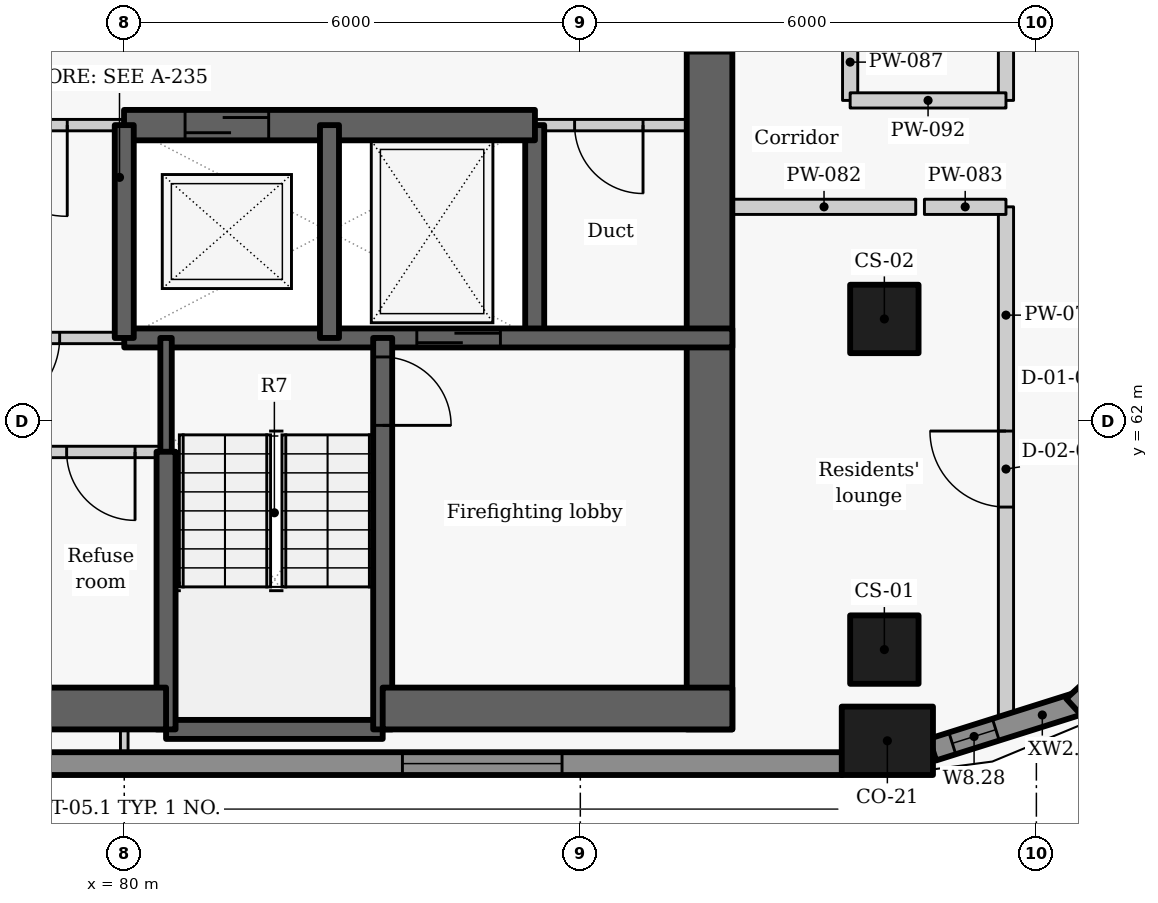
"""IFC4 building model, lengths in metres.
Left out: names, types, materials, properties, quantities, classifications, styles, units other than length and angle.
Written with IfcOpenShell. Run it as: python <this file> out.ifc"""

import sys

from ifc_helpers import new_model, si_unit, direction, frame, frame_2d, origin, origin_2d, place, context, subcontext, project, spatial, rectangle, extrude, element, fill, save


model = new_model("IFC4")
c1 = context("Model", 3, precision=1e-05, world=origin(), true_north=direction((0.0, 1.0)))
c2 = subcontext(c1, "Body", "Model", "MODEL_VIEW")
j1 = project(units=[si_unit("LENGTHUNIT", "METRE"), si_unit("PLANEANGLEUNIT", "RADIAN")], contexts=[c1])
p1 = place(None, origin())
s1 = spatial("IfcSite", under=j1, at=p1, CompositionType="ELEMENT")
p2 = place(p1, origin())
s2 = spatial("IfcBuilding", under=s1, at=p2, CompositionType="ELEMENT")
p3 = place(p2, frame((0.0, 0.0, 203.1)))
s3 = spatial("IfcBuildingStorey", under=s2, at=p3, CompositionType="ELEMENT", Elevation=203.1)
p4 = place(p3, frame((90.04, 57.8, 0.0), z_axis=(0.0, 0.0, 1.0), x_axis=(1.0, 0.0, 0.0)))
e1 = element("IfcColumn", 1, at=p4, inside=s3, PredefinedType="COLUMN", context=c2, shape_type="SweptSolid", body=[
    extrude(rectangle(XDim=1.2, YDim=0.9, at=origin_2d()), origin(), (0.0, 0.0, 1.0), 3.3),
])
for number, where, z_axis, x_axis in (
    (2, (90.0, 59.0, 0.0), (0.0, 0.0, 1.0), (0.0, 1.0, 0.0)),
    (3, (90.0, 63.35, 0.0), (0.0, 0.0, 1.0), (0.0, 1.0, 0.0)),
):
    element("IfcColumn", number, at=place(p3, frame(where, z_axis=z_axis, x_axis=x_axis)), inside=s3, PredefinedType="COLUMN", context=c2, shape_type="SweptSolid", body=[
        extrude(rectangle(XDim=0.9, YDim=0.9, at=origin_2d()), origin(), (0.0, 0.0, 1.0), 3.3),
    ])
p5 = place(p3, frame((70.551, 57.5, 0.0), z_axis=(0.0, 0.0, 1.0), x_axis=(1.0, 0.0, 0.0)))
e4 = element("IfcWall", 4, at=p5, inside=s3, PredefinedType="SOLIDWALL", context=c2, shape_type="SweptSolid", body=[
    extrude(rectangle(XDim=18.893, YDim=0.3, at=frame_2d((9.446, 0.0))), origin(), (0.0, 0.0, 1.0), 2.425),
])
p6 = place(p5, frame((3.687, 0.0, 0.9)))
e5 = element("IfcOpeningElement", 5, at=p6, cuts=e4, PredefinedType="OPENING", context=c2, shape_type="SweptSolid", body=[
    extrude(rectangle(XDim=2.1, YDim=1.1, at=frame_2d((1.05, 0.55))), frame((0.0, 0.16, 0.0), z_axis=(0.0, -1.0, 0.0), x_axis=(1.0, 0.0, 0.0)), (0.0, 0.0, 1.0), 0.32),
])
p7 = place(p5, frame((13.109, 0.0, 0.9)))
e6 = element("IfcOpeningElement", 6, at=p7, cuts=e4, PredefinedType="OPENING", context=c2, shape_type="SweptSolid", body=[
    extrude(rectangle(XDim=2.1, YDim=1.1, at=frame_2d((1.05, 0.55))), frame((0.0, 0.16, 0.0), z_axis=(0.0, -1.0, 0.0), x_axis=(1.0, 0.0, 0.0)), (0.0, 0.0, 1.0), 0.32),
])
p8 = place(p3, frame((90.636, 57.685, 0.0), z_axis=(0.0, 0.0, 1.0), x_axis=(0.95368324118, 0.300812691707, 0.0)))
e7 = element("IfcWall", 7, at=p8, inside=s3, PredefinedType="SOLIDWALL", context=c2, shape_type="SweptSolid", body=[
    extrude(rectangle(XDim=2.053, YDim=0.3, at=frame_2d((1.027, 0.0))), origin(), (0.0, 0.0, 1.0), 2.425),
])
p9 = place(p8, frame((0.271, 0.0, 0.9)))
e8 = element("IfcOpeningElement", 8, at=p9, cuts=e7, PredefinedType="OPENING", context=c2, shape_type="SweptSolid", body=[
    extrude(rectangle(XDim=0.6, YDim=1.1, at=frame_2d((0.3, 0.55))), frame((0.0, 0.16, 0.0), z_axis=(0.0, -1.0, 0.0), x_axis=(1.0, 0.0, 0.0)), (0.0, 0.0, 1.0), 0.32),
])
p10 = place(p3, frame((92.494, 58.244, 0.0), z_axis=(0.0, 0.0, 1.0), x_axis=(0.73764876128, 0.675184645102, 0.0)))
e9 = element("IfcWall", 9, at=p10, inside=s3, PredefinedType="SOLIDWALL", context=c2, shape_type="SweptSolid", body=[
    extrude(rectangle(XDim=2.048, YDim=0.3, at=frame_2d((1.024, 0.0))), origin(), (0.0, 0.0, 1.0), 2.425),
])
p11 = place(p3, frame((85.4, 63.1, -0.275), z_axis=(0.0, 0.0, 1.0), x_axis=(0.0, 1.0, 0.0)))
e10 = element("IfcWall", 10, at=p11, inside=s3, PredefinedType="SHEAR", context=c2, shape_type="SweptSolid", body=[
    extrude(rectangle(XDim=2.8, YDim=0.25, at=frame_2d((1.4, 0.0))), origin(), (0.0, 0.0, 1.0), 3.3),
])
p12 = place(p3, frame((87.7, 72.2, -0.275), z_axis=(0.0, 0.0, 1.0), x_axis=(0.0, -1.0, 0.0)))
e11 = element("IfcWall", 11, at=p12, inside=s3, PredefinedType="SHEAR", context=c2, shape_type="SweptSolid", body=[
    extrude(rectangle(XDim=14.25, YDim=0.6, at=frame_2d((7.125, 0.0))), origin(), (0.0, 0.0, 1.0), 3.3),
])
p13 = place(p12, frame((3.852, 0.0, 0.275)))
e12 = element("IfcOpeningElement", 12, at=p13, cuts=e11, PredefinedType="OPENING", context=c2, shape_type="SweptSolid", body=[
    extrude(rectangle(XDim=1.5, YDim=2.1, at=frame_2d((0.75, 1.05))), frame((0.0, 0.31, 0.0), z_axis=(0.0, -1.0, 0.0), x_axis=(1.0, 0.0, 0.0)), (0.0, 0.0, 1.0), 0.62),
])
p14 = place(p3, frame((80.003, 65.9, 0.0), z_axis=(0.0, 0.0, 1.0), x_axis=(-1.0, 0.0, 0.0)))
e13 = element("IfcWall", 13, at=p14, inside=s3, PredefinedType="PARTITIONING", context=c2, shape_type="SweptSolid", body=[
    extrude(rectangle(XDim=2.706, YDim=0.15, at=frame_2d((1.353, 0.0))), origin(), (0.0, 0.0, 1.0), 3.025),
])
p15 = place(p14, frame((0.753, 0.0, 0.0)))
e14 = element("IfcOpeningElement", 14, at=p15, cuts=e13, PredefinedType="OPENING", context=c2, shape_type="SweptSolid", body=[
    extrude(rectangle(XDim=1.2, YDim=2.1, at=frame_2d((0.6, 1.05))), frame((0.0, 0.085, 0.0), z_axis=(0.0, -1.0, 0.0), x_axis=(1.0, 0.0, 0.0)), (0.0, 0.0, 1.0), 0.17),
])
p16 = place(p3, frame((88.0, 65.9, 0.0), z_axis=(0.0, 0.0, 1.0), x_axis=(-1.0, 0.0, 0.0)))
e15 = element("IfcWall", 15, at=p16, inside=s3, PredefinedType="PARTITIONING", context=c2, shape_type="SweptSolid", body=[
    extrude(rectangle(XDim=2.603, YDim=0.15, at=frame_2d((1.302, 0.0))), origin(), (0.0, 0.0, 1.0), 3.025),
])
p17 = place(p16, frame((1.175, 0.0, 0.0)))
e16 = element("IfcOpeningElement", 16, at=p17, cuts=e15, PredefinedType="OPENING", context=c2, shape_type="SweptSolid", body=[
    extrude(rectangle(XDim=0.9, YDim=2.1, at=frame_2d((0.45, 1.05))), frame((0.0, 0.085, 0.0), z_axis=(0.0, -1.0, 0.0), x_axis=(1.0, 0.0, 0.0)), (0.0, 0.0, 1.0), 0.17),
])
p18 = place(p3, frame((79.997, 65.9, -0.275), z_axis=(0.0, 0.0, 1.0), x_axis=(1.0, 0.0, 0.0)))
e17 = element("IfcWall", 17, at=p18, inside=s3, PredefinedType="SHEAR", context=c2, shape_type="SweptSolid", body=[
    extrude(rectangle(XDim=5.406, YDim=0.4, at=frame_2d((2.703, 0.0))), origin(), (0.0, 0.0, 1.0), 3.3),
])
p19 = place(p18, frame((0.803, 0.0, 0.275)))
e18 = element("IfcOpeningElement", 18, at=p19, cuts=e17, PredefinedType="OPENING", context=c2, shape_type="SweptSolid", body=[
    extrude(rectangle(XDim=1.1, YDim=2.1, at=frame_2d((0.55, 1.05))), frame((0.0, 0.21, 0.0), z_axis=(0.0, -1.0, 0.0), x_axis=(1.0, 0.0, 0.0)), (0.0, 0.0, 1.0), 0.42),
])
p20 = place(p3, frame((80.0, 63.1, -0.275), z_axis=(0.0, 0.0, 1.0), x_axis=(1.0, 0.0, 0.0)))
e19 = element("IfcWall", 19, at=p20, inside=s3, PredefinedType="SHEAR", context=c2, shape_type="SweptSolid", body=[
    extrude(rectangle(XDim=8.0, YDim=0.25, at=frame_2d((4.0, 0.0))), origin(), (0.0, 0.0, 1.0), 3.3),
])
p21 = place(p20, frame((3.849, 0.0, 0.275)))
e20 = element("IfcOpeningElement", 20, at=p21, cuts=e19, PredefinedType="OPENING", context=c2, shape_type="SweptSolid", body=[
    extrude(rectangle(XDim=1.1, YDim=2.1, at=frame_2d((0.55, 1.05))), frame((0.0, 0.135, 0.0), z_axis=(0.0, -1.0, 0.0), x_axis=(1.0, 0.0, 0.0)), (0.0, 0.0, 1.0), 0.27),
])
p22 = place(p3, frame((80.0, 63.1, -0.275), z_axis=(0.0, 0.0, 1.0), x_axis=(0.0, 1.0, 0.0)))
e21 = element("IfcWall", 21, at=p22, inside=s3, PredefinedType="SHEAR", context=c2, shape_type="SweptSolid", body=[
    extrude(rectangle(XDim=2.8, YDim=0.25, at=frame_2d((1.4, 0.0))), origin(), (0.0, 0.0, 1.0), 3.3),
])
p23 = place(p3, frame((80.0, 63.1, 0.0), z_axis=(0.0, 0.0, 1.0), x_axis=(-1.0, 0.0, 0.0)))
e22 = element("IfcWall", 22, at=p23, inside=s3, PredefinedType="PARTITIONING", context=c2, shape_type="SweptSolid", body=[
    extrude(rectangle(XDim=2.7, YDim=0.15, at=frame_2d((1.35, 0.0))), origin(), (0.0, 0.0, 1.0), 3.025),
])
p24 = place(p23, frame((0.85, 0.0, 0.0)))
e23 = element("IfcOpeningElement", 23, at=p24, cuts=e22, PredefinedType="OPENING", context=c2, shape_type="SweptSolid", body=[
    extrude(rectangle(XDim=1.0, YDim=2.1, at=frame_2d((0.5, 1.05))), frame((0.0, 0.085, 0.0), z_axis=(0.0, -1.0, 0.0), x_axis=(1.0, 0.0, 0.0)), (0.0, 0.0, 1.0), 0.17),
])
p25 = place(p3, frame((82.7, 63.1, -0.275), z_axis=(0.0, 0.0, 1.0), x_axis=(0.0, 1.0, 0.0)))
e24 = element("IfcWall", 24, at=p25, inside=s3, PredefinedType="SHEAR", context=c2, shape_type="SweptSolid", body=[
    extrude(rectangle(XDim=2.8, YDim=0.25, at=frame_2d((1.4, 0.0))), origin(), (0.0, 0.0, 1.0), 3.3),
])
p26 = place(p3, frame((80.55, 57.95, -0.275), z_axis=(0.0, 0.0, 1.0), x_axis=(1.0, 0.0, 0.0)))
e25 = element("IfcWall", 25, at=p26, inside=s3, PredefinedType="SHEAR", context=c2, shape_type="SweptSolid", body=[
    extrude(rectangle(XDim=2.85, YDim=0.25, at=frame_2d((1.425, 0.0))), origin(), (0.0, 0.0, 1.0), 3.3),
])
p27 = place(p3, frame((83.4, 63.1, -0.275), z_axis=(0.0, 0.0, 1.0), x_axis=(0.0, -1.0, 0.0)))
e26 = element("IfcWall", 26, at=p27, inside=s3, PredefinedType="SHEAR", context=c2, shape_type="SweptSolid", body=[
    extrude(rectangle(XDim=5.15, YDim=0.25, at=frame_2d((2.575, 0.0))), origin(), (0.0, 0.0, 1.0), 3.3),
])
p28 = place(p27, frame((0.25, 0.0, 0.275)))
e27 = element("IfcOpeningElement", 27, at=p28, cuts=e26, PredefinedType="OPENING", context=c2, shape_type="SweptSolid", body=[
    extrude(rectangle(XDim=0.9, YDim=2.1, at=frame_2d((0.45, 1.05))), frame((0.0, 0.135, 0.0), z_axis=(0.0, -1.0, 0.0), x_axis=(1.0, 0.0, 0.0)), (0.0, 0.0, 1.0), 0.27),
])
p29 = place(p3, frame((80.55, 61.597, -0.275), z_axis=(0.0, 0.0, 1.0), x_axis=(0.0, 1.0, 0.0)))
e28 = element("IfcWall", 28, at=p29, inside=s3, PredefinedType="SHEAR", context=c2, shape_type="SweptSolid", body=[
    extrude(rectangle(XDim=1.503, YDim=0.15, at=frame_2d((0.751, 0.0))), origin(), (0.0, 0.0, 1.0), 3.3),
])
p30 = place(p3, frame((80.55, 57.95, -0.275), z_axis=(0.0, 0.0, 1.0), x_axis=(0.0, 1.0, 0.0)))
e29 = element("IfcWall", 29, at=p30, inside=s3, PredefinedType="SHEAR", context=c2, shape_type="SweptSolid", body=[
    extrude(rectangle(XDim=3.653, YDim=0.25, at=frame_2d((1.827, 0.0))), origin(), (0.0, 0.0, 1.0), 3.3),
])
p31 = place(p3, frame((75.35, 58.225, -0.275), z_axis=(0.0, 0.0, 1.0), x_axis=(1.0, 0.0, 0.0)))
e30 = element("IfcWall", 30, at=p31, inside=s3, PredefinedType="SHEAR", context=c2, shape_type="SweptSolid", body=[
    extrude(rectangle(XDim=5.2, YDim=0.55, at=frame_2d((2.6, 0.0))), origin(), (0.0, 0.0, 1.0), 3.3),
])
p32 = place(p3, frame((83.4, 58.225, -0.275), z_axis=(0.0, 0.0, 1.0), x_axis=(1.0, 0.0, 0.0)))
e31 = element("IfcWall", 31, at=p32, inside=s3, PredefinedType="SHEAR", context=c2, shape_type="SweptSolid", body=[
    extrude(rectangle(XDim=4.6, YDim=0.55, at=frame_2d((2.3, 0.0))), origin(), (0.0, 0.0, 1.0), 3.3),
])
p33 = place(p3, frame((80.55, 61.6, 0.0), z_axis=(0.0, 0.0, 1.0), x_axis=(-1.0, 0.0, 0.0)))
e32 = element("IfcWall", 32, at=p33, inside=s3, PredefinedType="PARTITIONING", context=c2, shape_type="SweptSolid", body=[
    extrude(rectangle(XDim=5.2, YDim=0.15, at=frame_2d((2.6, 0.0))), origin(), (0.0, 0.0, 1.0), 3.025),
])
p34 = place(p33, frame((3.866, 0.0, 0.0)))
e33 = element("IfcOpeningElement", 33, at=p34, cuts=e32, PredefinedType="OPENING", context=c2, shape_type="SweptSolid", body=[
    extrude(rectangle(XDim=0.9, YDim=2.1, at=frame_2d((0.45, 1.05))), frame((0.0, 0.085, 0.0), z_axis=(0.0, -1.0, 0.0), x_axis=(1.0, 0.0, 0.0)), (0.0, 0.0, 1.0), 0.17),
])
p35 = place(p33, frame((2.124, 0.0, 0.0)))
e34 = element("IfcOpeningElement", 34, at=p35, cuts=e32, PredefinedType="OPENING", context=c2, shape_type="SweptSolid", body=[
    extrude(rectangle(XDim=0.9, YDim=2.1, at=frame_2d((0.45, 1.05))), frame((0.0, 0.085, 0.0), z_axis=(0.0, -1.0, 0.0), x_axis=(1.0, 0.0, 0.0)), (0.0, 0.0, 1.0), 0.17),
])
p36 = place(p33, frame((0.408, 0.0, 0.0)))
e35 = element("IfcOpeningElement", 35, at=p36, cuts=e32, PredefinedType="OPENING", context=c2, shape_type="SweptSolid", body=[
    extrude(rectangle(XDim=0.9, YDim=2.1, at=frame_2d((0.45, 1.05))), frame((0.0, 0.085, 0.0), z_axis=(0.0, -1.0, 0.0), x_axis=(1.0, 0.0, 0.0)), (0.0, 0.0, 1.0), 0.17),
])
p37 = place(p3, frame((91.6, 57.926, 0.0), z_axis=(0.0, 0.0, 1.0), x_axis=(0.0, 1.0, 0.0)))
e36 = element("IfcWall", 36, at=p37, inside=s3, PredefinedType="PARTITIONING", context=c2, shape_type="SweptSolid", body=[
    extrude(rectangle(XDim=6.899, YDim=0.2, at=frame_2d((3.449, 0.0))), origin(), (0.0, 0.0, 1.0), 2.405),
])
p38 = place(p37, frame((2.949, 0.0, 0.0)))
e37 = element("IfcOpeningElement", 37, at=p38, cuts=e36, PredefinedType="OPENING", context=c2, shape_type="SweptSolid", body=[
    extrude(rectangle(XDim=1.0, YDim=2.1, at=frame_2d((0.5, 1.05))), frame((0.0, 0.11, 0.0), z_axis=(0.0, -1.0, 0.0), x_axis=(1.0, 0.0, 0.0)), (0.0, 0.0, 1.0), 0.22),
])
p39 = place(p3, frame((91.6, 66.225, 0.0), z_axis=(0.0, 0.0, 1.0), x_axis=(0.0, 1.0, 0.0)))
e38 = element("IfcWall", 38, at=p39, inside=s3, PredefinedType="PARTITIONING", context=c2, shape_type="SweptSolid", body=[
    extrude(rectangle(XDim=5.298, YDim=0.2, at=frame_2d((2.649, 0.0))), origin(), (0.0, 0.0, 1.0), 3.025),
])
p40 = place(p39, frame((2.148, 0.0, 0.0)))
e39 = element("IfcOpeningElement", 39, at=p40, cuts=e38, PredefinedType="OPENING", context=c2, shape_type="SweptSolid", body=[
    extrude(rectangle(XDim=1.0, YDim=2.1, at=frame_2d((0.5, 1.05))), frame((0.0, 0.11, 0.0), z_axis=(0.0, -1.0, 0.0), x_axis=(1.0, 0.0, 0.0)), (0.0, 0.0, 1.0), 0.22),
])
p41 = place(p3, frame((88.0, 64.825, 0.0), z_axis=(0.0, 0.0, 1.0), x_axis=(1.0, 0.0, 0.0)))
e40 = element("IfcWall", 40, at=p41, inside=s3, PredefinedType="PARTITIONING", context=c2, shape_type="SweptSolid", body=[
    extrude(rectangle(XDim=2.413, YDim=0.2, at=frame_2d((1.207, 0.0))), origin(), (0.0, 0.0, 1.0), 2.505),
])
p42 = place(p3, frame((90.527, 64.825, 0.0), z_axis=(0.0, 0.0, 1.0), x_axis=(1.0, 0.0, 0.0)))
e41 = element("IfcWall", 41, at=p42, inside=s3, PredefinedType="PARTITIONING", context=c2, shape_type="SweptSolid", body=[
    extrude(rectangle(XDim=1.073, YDim=0.2, at=frame_2d((0.537, 0.0))), origin(), (0.0, 0.0, 1.0), 3.025),
])
p43 = place(p3, frame((89.55, 66.225, 0.0), z_axis=(0.0, 0.0, 1.0), x_axis=(0.0, 1.0, 0.0)))
e42 = element("IfcWall", 42, at=p43, inside=s3, PredefinedType="PARTITIONING", context=c2, shape_type="SweptSolid", body=[
    extrude(rectangle(XDim=1.008, YDim=0.2, at=frame_2d((0.504, 0.0))), origin(), (0.0, 0.0, 1.0), 3.025),
])
p44 = place(p3, frame((89.55, 66.225, 0.0), z_axis=(0.0, 0.0, 1.0), x_axis=(1.0, 0.0, 0.0)))
e43 = element("IfcWall", 43, at=p44, inside=s3, PredefinedType="PARTITIONING", context=c2, shape_type="SweptSolid", body=[
    extrude(rectangle(XDim=2.05, YDim=0.2, at=frame_2d((1.025, 0.0))), origin(), (0.0, 0.0, 1.0), 2.505),
])
p45 = place(p3, frame((80.0, 57.65, 0.0), z_axis=(0.0, 0.0, 1.0), x_axis=(0.0, 1.0, 0.0)))
e44 = element("IfcWall", 44, at=p45, inside=s3, PredefinedType="PARTITIONING", context=c2, shape_type="SweptSolid", body=[
    extrude(rectangle(XDim=0.3, YDim=0.1, at=frame_2d((0.15, 0.0))), origin(), (0.0, 0.0, 1.0), 3.025),
])
p46 = place(p7, origin())
e45 = element("IfcWindow", 45, at=p46, inside=s3, PartitioningType="SINGLE_PANEL", PredefinedType="WINDOW", context=c2, shape_type="SweptSolid", body=[
    extrude(rectangle(XDim=2.1, YDim=1.1, at=frame_2d((1.05, 0.55))), frame((0.0, 0.03, 0.0), z_axis=(0.0, -1.0, 0.0), x_axis=(1.0, 0.0, 0.0)), (0.0, 0.0, 1.0), 0.06),
])
fill(e6, e45)
p47 = place(p9, origin())
e46 = element("IfcWindow", 46, at=p47, inside=s3, PartitioningType="SINGLE_PANEL", PredefinedType="WINDOW", context=c2, shape_type="SweptSolid", body=[
    extrude(rectangle(XDim=0.6, YDim=1.1, at=frame_2d((0.3, 0.55))), frame((0.0, 0.03, 0.0), z_axis=(0.0, -1.0, 0.0), x_axis=(1.0, 0.0, 0.0)), (0.0, 0.0, 1.0), 0.06),
])
fill(e8, e46)
p48 = place(p15, origin())
e47 = element("IfcDoor", 47, at=p48, inside=s3, OperationType="DOUBLE_DOOR_SINGLE_SWING", PredefinedType="DOOR", context=c2, shape_type="SweptSolid", body=[
    extrude(rectangle(XDim=1.2, YDim=2.1, at=frame_2d((0.6, 1.05))), frame((0.0, 0.025, 0.0), z_axis=(0.0, -1.0, 0.0), x_axis=(1.0, 0.0, 0.0)), (0.0, 0.0, 1.0), 0.05),
])
fill(e14, e47)
p49 = place(p19, origin())
e48 = element("IfcDoor", 48, at=p49, inside=s3, OperationType="SLIDING_TO_LEFT", PredefinedType="DOOR", context=c2, shape_type="SweptSolid", body=[
    extrude(rectangle(XDim=1.1, YDim=2.1, at=frame_2d((0.55, 1.05))), frame((0.0, 0.025, 0.0), z_axis=(0.0, -1.0, 0.0), x_axis=(1.0, 0.0, 0.0)), (0.0, 0.0, 1.0), 0.05),
])
fill(e18, e48)
p50 = place(p21, origin())
e49 = element("IfcDoor", 49, at=p50, inside=s3, OperationType="SLIDING_TO_LEFT", PredefinedType="DOOR", context=c2, shape_type="SweptSolid", body=[
    extrude(rectangle(XDim=1.1, YDim=2.1, at=frame_2d((0.55, 1.05))), frame((0.0, 0.025, 0.0), z_axis=(0.0, -1.0, 0.0), x_axis=(1.0, 0.0, 0.0)), (0.0, 0.0, 1.0), 0.05),
])
fill(e20, e49)
p51 = place(p17, origin())
e50 = element("IfcDoor", 50, at=p51, inside=s3, OperationType="SINGLE_SWING_LEFT", PredefinedType="DOOR", context=c2, shape_type="SweptSolid", body=[
    extrude(rectangle(XDim=0.9, YDim=2.1, at=frame_2d((0.45, 1.05))), frame((0.0, 0.025, 0.0), z_axis=(0.0, -1.0, 0.0), x_axis=(1.0, 0.0, 0.0)), (0.0, 0.0, 1.0), 0.05),
])
fill(e16, e50)
p52 = place(p24, origin())
e51 = element("IfcDoor", 51, at=p52, inside=s3, OperationType="SINGLE_SWING_RIGHT", PredefinedType="DOOR", context=c2, shape_type="SweptSolid", body=[
    extrude(rectangle(XDim=1.0, YDim=2.1, at=frame_2d((0.5, 1.05))), frame((0.0, 0.025, 0.0), z_axis=(0.0, -1.0, 0.0), x_axis=(1.0, 0.0, 0.0)), (0.0, 0.0, 1.0), 0.05),
])
fill(e23, e51)
p53 = place(p36, origin())
e52 = element("IfcDoor", 52, at=p53, inside=s3, OperationType="SINGLE_SWING_LEFT", PredefinedType="DOOR", context=c2, shape_type="SweptSolid", body=[
    extrude(rectangle(XDim=0.9, YDim=2.1, at=frame_2d((0.45, 1.05))), frame((0.0, 0.025, 0.0), z_axis=(0.0, -1.0, 0.0), x_axis=(1.0, 0.0, 0.0)), (0.0, 0.0, 1.0), 0.05),
])
fill(e35, e52)
p54 = place(p28, origin())
e53 = element("IfcDoor", 53, at=p54, inside=s3, OperationType="SINGLE_SWING_RIGHT", PredefinedType="DOOR", context=c2, shape_type="SweptSolid", body=[
    extrude(rectangle(XDim=0.9, YDim=2.1, at=frame_2d((0.45, 1.05))), frame((0.0, 0.025, 0.0), z_axis=(0.0, -1.0, 0.0), x_axis=(1.0, 0.0, 0.0)), (0.0, 0.0, 1.0), 0.05),
])
fill(e27, e53)
p55 = place(p38, origin())
e54 = element("IfcDoor", 54, at=p55, inside=s3, OperationType="SINGLE_SWING_RIGHT", PredefinedType="DOOR", context=c2, shape_type="SweptSolid", body=[
    extrude(rectangle(XDim=1.0, YDim=2.1, at=frame_2d((0.5, 1.05))), frame((0.0, 0.025, 0.0), z_axis=(0.0, -1.0, 0.0), x_axis=(1.0, 0.0, 0.0)), (0.0, 0.0, 1.0), 0.05),
])
fill(e37, e54)
p56 = place(p13, origin())
e55 = element("IfcDoor", 55, at=p56, inside=s3, OperationType="DOUBLE_DOOR_SINGLE_SWING", PredefinedType="DOOR", context=c2, shape_type="SweptSolid", body=[
    extrude(rectangle(XDim=1.5, YDim=2.1, at=frame_2d((0.75, 1.05))), frame((0.0, 0.025, 0.0), z_axis=(0.0, -1.0, 0.0), x_axis=(1.0, 0.0, 0.0)), (0.0, 0.0, 1.0), 0.05),
])
fill(e12, e55)
save(model, sys.argv[1])
